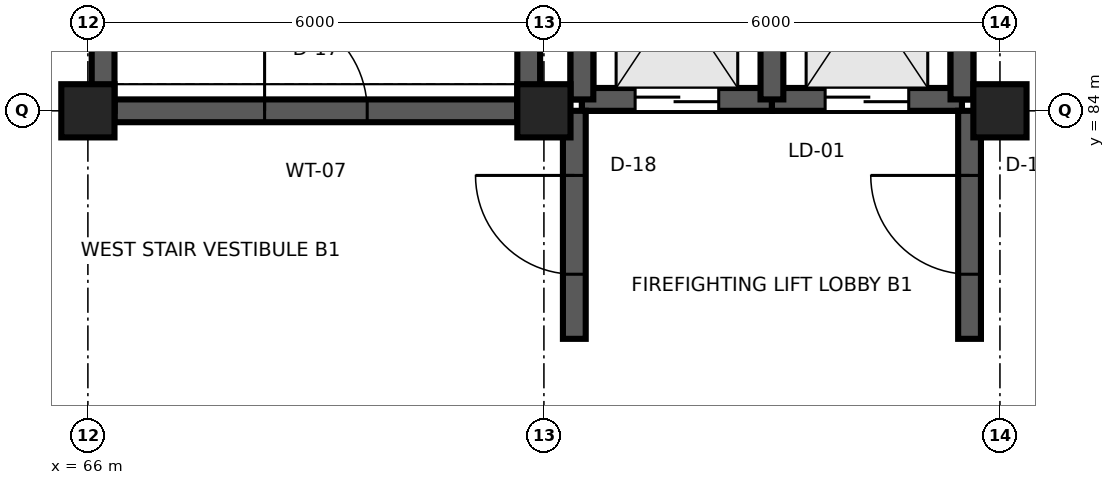
"""IFC4 building model, lengths in metres.
Left out: names, types, materials, properties, quantities, classifications, styles, units other than length and angle.
Written with IfcOpenShell. Run it as: python <this file> out.ifc"""

import sys

from ifc_helpers import new_model, si_unit, direction, frame, frame_2d, origin, origin_2d, place, context, subcontext, project, spatial, rectangle, extrude, element, fill, save


model = new_model("IFC4")
c1 = context("Model", 3, precision=1e-05, world=origin(), true_north=direction((0.0, 1.0)))
c2 = subcontext(c1, "Body", "Model", "MODEL_VIEW")
j1 = project(units=[si_unit("LENGTHUNIT", "METRE"), si_unit("PLANEANGLEUNIT", "RADIAN")], contexts=[c1])
p1 = place(None, origin())
s1 = spatial("IfcSite", under=j1, at=p1, CompositionType="ELEMENT")
p2 = place(p1, origin())
s2 = spatial("IfcBuilding", under=s1, at=p2, CompositionType="ELEMENT")
p3 = place(p2, frame((0.0, 0.0, -4.8)))
s3 = spatial("IfcBuildingStorey", under=s2, at=p3, CompositionType="ELEMENT", Elevation=-4.8)
for number, where, z_axis, x_axis in (
    (1, (66.0, 84.0, 0.0), (0.0, 0.0, 1.0), (1.0, 0.0, 0.0)),
    (2, (72.0, 84.0, 0.0), (0.0, 0.0, 1.0), (1.0, 0.0, 0.0)),
    (3, (78.0, 84.0, 0.0), (0.0, 0.0, 1.0), (1.0, 0.0, 0.0)),
):
    element("IfcColumn", number, at=place(p3, frame(where, z_axis=z_axis, x_axis=x_axis)), inside=s3, PredefinedType="COLUMN", context=c2, shape_type="SweptSolid", body=[
        extrude(rectangle(XDim=0.7, YDim=0.7, at=origin_2d()), origin(), (0.0, 0.0, 1.0), 4.8),
    ])
p4 = place(p3, frame((66.35, 84.0, 0.0), z_axis=(0.0, 0.0, 1.0), x_axis=(1.0, 0.0, 0.0)))
e4 = element("IfcWall", 4, at=p4, inside=s3, PredefinedType="SHEAR", context=c2, shape_type="SweptSolid", body=[
    extrude(rectangle(XDim=5.3, YDim=0.3, at=frame_2d((2.65, 0.0))), origin(), (0.0, 0.0, 1.0), 4.48),
])
p5 = place(p4, frame((1.975, 0.0, 0.0)))
e5 = element("IfcOpeningElement", 5, at=p5, cuts=e4, PredefinedType="OPENING", context=c2, shape_type="SweptSolid", body=[
    extrude(rectangle(XDim=1.35, YDim=2.2, at=frame_2d((0.675, 1.1))), frame((0.0, 0.165, 0.0), z_axis=(0.0, -1.0, 0.0), x_axis=(1.0, 0.0, 0.0)), (0.0, 0.0, 1.0), 0.33),
])
for number, where, z_axis, x_axis in (
    (6, (66.2, 84.0, 0.0), (0.0, 0.0, 1.0), (0.0, 1.0, 0.0)),
    (7, (71.8, 84.0, 0.0), (0.0, 0.0, 1.0), (0.0, 1.0, 0.0)),
):
    element("IfcWall", number, at=place(p3, frame(where, z_axis=z_axis, x_axis=x_axis)), inside=s3, PredefinedType="SHEAR", context=c2, shape_type="SweptSolid", body=[
        extrude(rectangle(XDim=11.8, YDim=0.3, at=frame_2d((5.9, 0.0))), origin(), (0.0, 0.0, 1.0), 4.48),
    ])
p6 = place(p3, frame((72.5, 84.15, -1.6), z_axis=(0.0, 0.0, 1.0), x_axis=(1.0, 0.0, 0.0)))
e8 = element("IfcWall", 8, at=p6, inside=s3, PredefinedType="SHEAR", context=c2, shape_type="SweptSolid", body=[
    extrude(rectangle(XDim=5.0, YDim=0.3, at=frame_2d((2.5, 0.0))), origin(), (0.0, 0.0, 1.0), 1.6),
])
for number, where, z_axis, x_axis in (
    (9, (72.5, 84.15, -1.6), (0.0, 0.0, 1.0), (0.0, 1.0, 0.0)),
    (10, (77.5, 84.15, -1.6), (0.0, 0.0, 1.0), (0.0, 1.0, 0.0)),
):
    element("IfcWall", number, at=place(p3, frame(where, z_axis=z_axis, x_axis=x_axis)), inside=s3, PredefinedType="SHEAR", context=c2, shape_type="SweptSolid", body=[
        extrude(rectangle(XDim=3.4, YDim=0.3, at=frame_2d((1.7, 0.0))), origin(), (0.0, 0.0, 1.0), 1.6),
    ])
p7 = place(p3, frame((72.5, 84.15, 0.0), z_axis=(0.0, 0.0, 1.0), x_axis=(1.0, 0.0, 0.0)))
e11 = element("IfcWall", 11, at=p7, inside=s3, PredefinedType="SHEAR", context=c2, shape_type="SweptSolid", body=[
    extrude(rectangle(XDim=2.5, YDim=0.3, at=frame_2d((1.25, 0.0))), origin(), (0.0, 0.0, 1.0), 4.48),
])
p8 = place(p7, frame((0.7, 0.0, 0.0)))
e12 = element("IfcOpeningElement", 12, at=p8, cuts=e11, PredefinedType="OPENING", context=c2, shape_type="SweptSolid", body=[
    extrude(rectangle(XDim=1.1, YDim=2.1, at=frame_2d((0.55, 1.05))), frame((0.0, 0.165, 0.0), z_axis=(0.0, -1.0, 0.0), x_axis=(1.0, 0.0, 0.0)), (0.0, 0.0, 1.0), 0.33),
])
p9 = place(p3, frame((72.5, 84.15, 0.0), z_axis=(0.0, 0.0, 1.0), x_axis=(0.0, 1.0, 0.0)))
e13 = element("IfcWall", 13, at=p9, inside=s3, PredefinedType="SHEAR", context=c2, shape_type="SweptSolid", body=[
    extrude(rectangle(XDim=3.4, YDim=0.3, at=frame_2d((1.7, 0.0))), origin(), (0.0, 0.0, 1.0), 4.48),
])
p10 = place(p3, frame((75.0, 84.15, 0.0), z_axis=(0.0, 0.0, 1.0), x_axis=(1.0, 0.0, 0.0)))
e14 = element("IfcWall", 14, at=p10, inside=s3, PredefinedType="SHEAR", context=c2, shape_type="SweptSolid", body=[
    extrude(rectangle(XDim=2.5, YDim=0.3, at=frame_2d((1.25, 0.0))), origin(), (0.0, 0.0, 1.0), 4.48),
])
p11 = place(p10, frame((0.7, 0.0, 0.0)))
e15 = element("IfcOpeningElement", 15, at=p11, cuts=e14, PredefinedType="OPENING", context=c2, shape_type="SweptSolid", body=[
    extrude(rectangle(XDim=1.1, YDim=2.1, at=frame_2d((0.55, 1.05))), frame((0.0, 0.165, 0.0), z_axis=(0.0, -1.0, 0.0), x_axis=(1.0, 0.0, 0.0)), (0.0, 0.0, 1.0), 0.33),
])
for number, where, z_axis, x_axis in (
    (16, (75.0, 84.15, 0.0), (0.0, 0.0, 1.0), (0.0, 1.0, 0.0)),
    (17, (77.5, 84.15, 0.0), (0.0, 0.0, 1.0), (0.0, 1.0, 0.0)),
):
    element("IfcWall", number, at=place(p3, frame(where, z_axis=z_axis, x_axis=x_axis)), inside=s3, PredefinedType="SHEAR", context=c2, shape_type="SweptSolid", body=[
        extrude(rectangle(XDim=3.4, YDim=0.3, at=frame_2d((1.7, 0.0))), origin(), (0.0, 0.0, 1.0), 4.48),
    ])
p12 = place(p3, frame((72.4, 81.0, 0.0), z_axis=(0.0, 0.0, 1.0), x_axis=(0.0, 1.0, 0.0)))
e18 = element("IfcWall", 18, at=p12, inside=s3, PredefinedType="SHEAR", context=c2, shape_type="SweptSolid", body=[
    extrude(rectangle(XDim=3.0, YDim=0.3, at=frame_2d((1.5, 0.0))), origin(), (0.0, 0.0, 1.0), 4.48),
])
p13 = place(p12, frame((0.85, 0.0, 0.0)))
e19 = element("IfcOpeningElement", 19, at=p13, cuts=e18, PredefinedType="OPENING", context=c2, shape_type="SweptSolid", body=[
    extrude(rectangle(XDim=1.3, YDim=2.2, at=frame_2d((0.65, 1.1))), frame((0.0, 0.165, 0.0), z_axis=(0.0, -1.0, 0.0), x_axis=(1.0, 0.0, 0.0)), (0.0, 0.0, 1.0), 0.33),
])
p14 = place(p3, frame((77.6, 81.0, 0.0), z_axis=(0.0, 0.0, 1.0), x_axis=(0.0, 1.0, 0.0)))
e20 = element("IfcWall", 20, at=p14, inside=s3, PredefinedType="SHEAR", context=c2, shape_type="SweptSolid", body=[
    extrude(rectangle(XDim=3.0, YDim=0.3, at=frame_2d((1.5, 0.0))), origin(), (0.0, 0.0, 1.0), 4.48),
])
p15 = place(p14, frame((0.85, 0.0, 0.0)))
e21 = element("IfcOpeningElement", 21, at=p15, cuts=e20, PredefinedType="OPENING", context=c2, shape_type="SweptSolid", body=[
    extrude(rectangle(XDim=1.3, YDim=2.2, at=frame_2d((0.65, 1.1))), frame((0.0, 0.165, 0.0), z_axis=(0.0, -1.0, 0.0), x_axis=(1.0, 0.0, 0.0)), (0.0, 0.0, 1.0), 0.33),
])
p16 = place(p5, origin())
e22 = element("IfcDoor", 22, at=p16, inside=s3, OperationType="SINGLE_SWING_LEFT", PredefinedType="DOOR", context=c2, shape_type="SweptSolid", body=[
    extrude(rectangle(XDim=1.35, YDim=2.2, at=frame_2d((0.675, 1.1))), frame((0.0, 0.025, 0.0), z_axis=(0.0, -1.0, 0.0), x_axis=(1.0, 0.0, 0.0)), (0.0, 0.0, 1.0), 0.05),
])
fill(e5, e22)
p17 = place(p8, origin())
e23 = element("IfcDoor", 23, at=p17, inside=s3, OperationType="DOUBLE_DOOR_SLIDING", PredefinedType="DOOR", context=c2, shape_type="SweptSolid", body=[
    extrude(rectangle(XDim=1.1, YDim=2.1, at=frame_2d((0.55, 1.05))), frame((0.0, 0.025, 0.0), z_axis=(0.0, -1.0, 0.0), x_axis=(1.0, 0.0, 0.0)), (0.0, 0.0, 1.0), 0.05),
])
fill(e12, e23)
p18 = place(p11, origin())
e24 = element("IfcDoor", 24, at=p18, inside=s3, OperationType="DOUBLE_DOOR_SLIDING", PredefinedType="DOOR", context=c2, shape_type="SweptSolid", body=[
    extrude(rectangle(XDim=1.1, YDim=2.1, at=frame_2d((0.55, 1.05))), frame((0.0, 0.025, 0.0), z_axis=(0.0, -1.0, 0.0), x_axis=(1.0, 0.0, 0.0)), (0.0, 0.0, 1.0), 0.05),
])
fill(e15, e24)
p19 = place(p13, origin())
e25 = element("IfcDoor", 25, at=p19, inside=s3, OperationType="SINGLE_SWING_RIGHT", PredefinedType="DOOR", context=c2, shape_type="SweptSolid", body=[
    extrude(rectangle(XDim=1.3, YDim=2.2, at=frame_2d((0.65, 1.1))), frame((0.0, 0.025, 0.0), z_axis=(0.0, -1.0, 0.0), x_axis=(1.0, 0.0, 0.0)), (0.0, 0.0, 1.0), 0.05),
])
fill(e19, e25)
p20 = place(p15, origin())
e26 = element("IfcDoor", 26, at=p20, inside=s3, OperationType="SINGLE_SWING_RIGHT", PredefinedType="DOOR", context=c2, shape_type="SweptSolid", body=[
    extrude(rectangle(XDim=1.3, YDim=2.2, at=frame_2d((0.65, 1.1))), frame((0.0, 0.025, 0.0), z_axis=(0.0, -1.0, 0.0), x_axis=(1.0, 0.0, 0.0)), (0.0, 0.0, 1.0), 0.05),
])
fill(e21, e26)
save(model, sys.argv[1])
